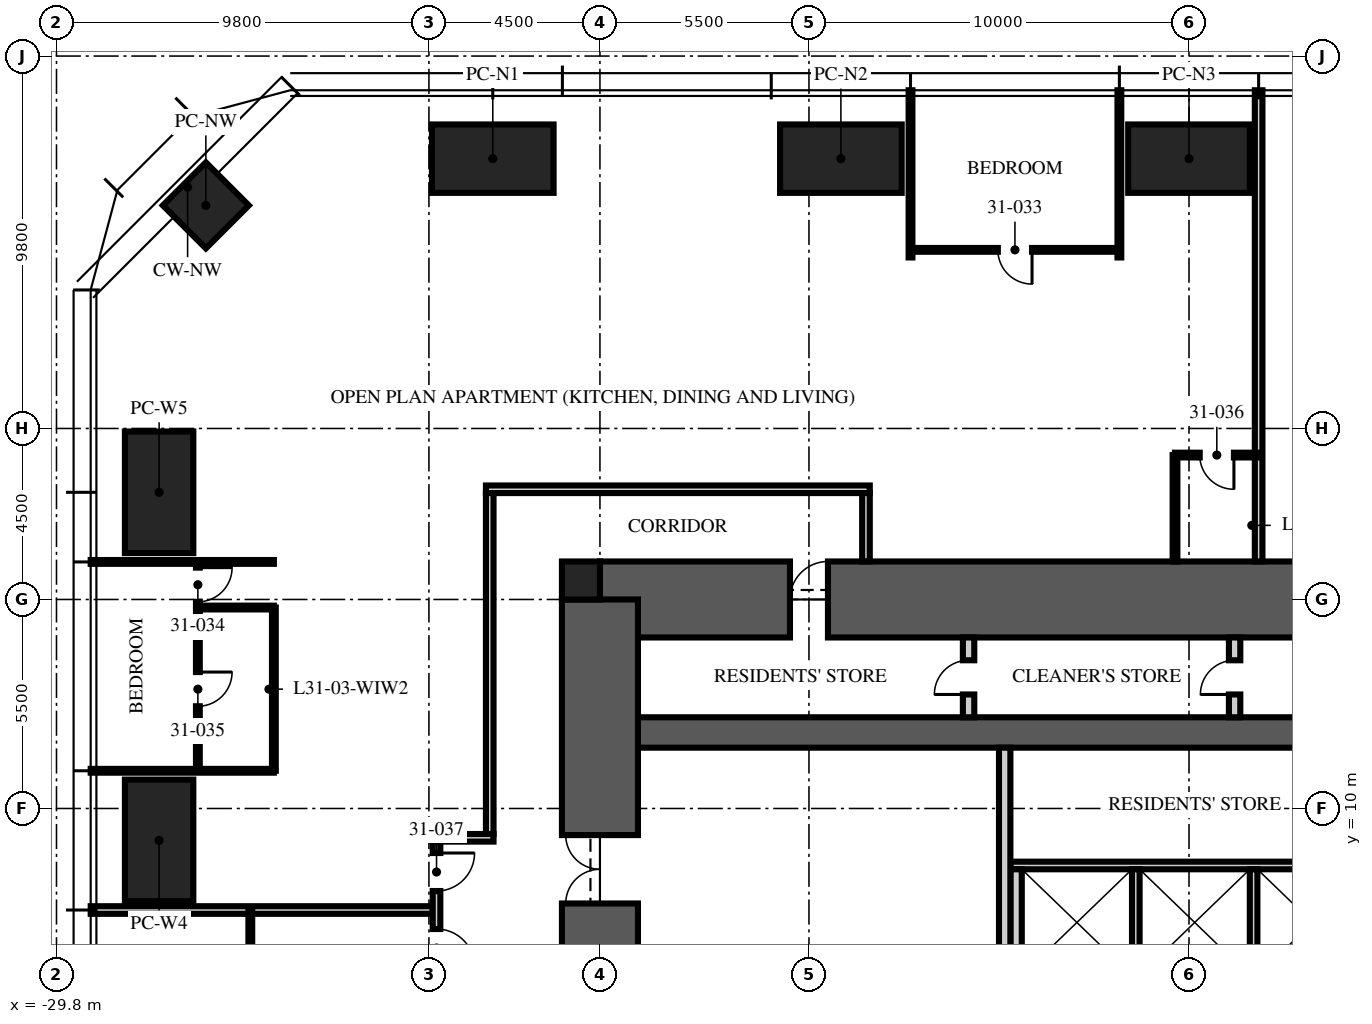
"""IFC4 building model, lengths in metres.
Left out: names, types, materials, properties, quantities, classifications, styles, units other than length and angle.
Written with IfcOpenShell. Run it as: python <this file> out.ifc"""

import sys

from ifc_helpers import new_model, si_unit, direction, frame, frame_2d, origin, origin_2d, place, context, subcontext, project, spatial, rectangle, extrude, element, fill, save


model = new_model("IFC4")
c1 = context("Model", 3, precision=1e-05, world=origin(), true_north=direction((0.0, 1.0)))
c2 = subcontext(c1, "Body", "Model", "MODEL_VIEW")
j1 = project(units=[si_unit("LENGTHUNIT", "METRE"), si_unit("PLANEANGLEUNIT", "RADIAN")], contexts=[c1])
p1 = place(None, origin())
s1 = spatial("IfcSite", under=j1, at=p1, CompositionType="ELEMENT")
p2 = place(p1, origin())
s2 = spatial("IfcBuilding", under=s1, at=p2, CompositionType="ELEMENT")
p3 = place(p2, frame((0.0, 0.0, 126.0)))
s3 = spatial("IfcBuildingStorey", under=s2, at=p3, CompositionType="ELEMENT", Elevation=126.0)
p4 = place(p3, frame((-15.5, 15.5, -0.25), z_axis=(0.0, 0.0, 1.0), x_axis=(1.0, 0.0, 0.0)))
e1 = element("IfcWall", 1, at=p4, inside=s3, PredefinedType="SHEAR", context=c2, shape_type="SweptSolid", body=[
    extrude(rectangle(XDim=31.0, YDim=2.0, at=frame_2d((15.5, 0.0))), origin(), (0.0, 0.0, 1.0), 3.75),
])
p5 = place(p4, frame((5.0, 0.0, 0.25)))
e2 = element("IfcOpeningElement", 2, at=p5, cuts=e1, PredefinedType="OPENING", context=c2, shape_type="SweptSolid", body=[
    extrude(rectangle(XDim=1.0, YDim=2.1, at=frame_2d((0.5, 1.05))), frame((0.0, 1.01, 0.0), z_axis=(0.0, -1.0, 0.0), x_axis=(1.0, 0.0, 0.0)), (0.0, 0.0, 1.0), 2.02),
])
p6 = place(p3, frame((-15.5, 12.0, -0.25), z_axis=(0.0, 0.0, 1.0), x_axis=(1.0, 0.0, 0.0)))
e3 = element("IfcWall", 3, at=p6, inside=s3, PredefinedType="SHEAR", context=c2, shape_type="SweptSolid", body=[
    extrude(rectangle(XDim=31.0, YDim=0.8, at=frame_2d((15.5, 0.0))), origin(), (0.0, 0.0, 1.0), 3.75),
])
p7 = place(p3, frame((-15.5, -15.5, -0.25), z_axis=(0.0, 0.0, 1.0), x_axis=(0.0, 1.0, 0.0)))
e4 = element("IfcWall", 4, at=p7, inside=s3, PredefinedType="SHEAR", context=c2, shape_type="SweptSolid", body=[
    extrude(rectangle(XDim=31.0, YDim=2.0, at=frame_2d((15.5, 0.0))), origin(), (0.0, 0.0, 1.0), 3.75),
])
p8 = place(p7, frame((6.5, 0.0, 0.25)))
e5 = element("IfcOpeningElement", 5, at=p8, cuts=e4, PredefinedType="OPENING", context=c2, shape_type="SweptSolid", body=[
    extrude(rectangle(XDim=1.2, YDim=2.1, at=frame_2d((0.6, 1.05))), frame((0.0, 1.01, 0.0), z_axis=(0.0, -1.0, 0.0), x_axis=(1.0, 0.0, 0.0)), (0.0, 0.0, 1.0), 2.02),
])
p9 = place(p7, frame((23.0, 0.0, 0.25)))
e6 = element("IfcOpeningElement", 6, at=p9, cuts=e4, PredefinedType="OPENING", context=c2, shape_type="SweptSolid", body=[
    extrude(rectangle(XDim=1.8, YDim=2.1, at=frame_2d((0.9, 1.05))), frame((0.0, 1.01, 0.0), z_axis=(0.0, -1.0, 0.0), x_axis=(1.0, 0.0, 0.0)), (0.0, 0.0, 1.0), 2.02),
])
p10 = place(p3, frame((-16.0, 16.0, -0.25), z_axis=(0.0, 0.0, 1.0), x_axis=(1.0, 0.0, 0.0)))
e7 = element("IfcColumn", 7, at=p10, inside=s3, PredefinedType="COLUMN", context=c2, shape_type="SweptSolid", body=[
    extrude(rectangle(XDim=1.0, YDim=1.0, at=origin_2d()), origin(), (0.0, 0.0, 1.0), 3.75),
])
for number, where, z_axis, x_axis in (
    (8, (-18.32, 27.1, 0.0), (0.0, 0.0, 1.0), (1.0, 0.0, 0.0)),
    (9, (-9.16, 27.1, 0.0), (0.0, 0.0, 1.0), (1.0, 0.0, 0.0)),
    (10, (0.0, 27.1, 0.0), (0.0, 0.0, 1.0), (1.0, 0.0, 0.0)),
    (11, (-27.1, 9.16, 0.0), (0.0, 0.0, 1.0), (0.0, 1.0, 0.0)),
    (12, (-27.1, 18.32, 0.0), (0.0, 0.0, 1.0), (0.0, 1.0, 0.0)),
):
    element("IfcColumn", number, at=place(p3, frame(where, z_axis=z_axis, x_axis=x_axis)), inside=s3, PredefinedType="COLUMN", context=c2, shape_type="SweptSolid", body=[
        extrude(rectangle(XDim=3.2, YDim=1.8, at=origin_2d()), origin(), (0.0, 0.0, 1.0), 3.75),
    ])
p11 = place(p3, frame((-25.87, 25.87, 0.0), z_axis=(0.0, 0.0, 1.0), x_axis=(0.707106781187, 0.707106781187, 0.0)))
e13 = element("IfcColumn", 13, at=p11, inside=s3, PredefinedType="COLUMN", context=c2, shape_type="SweptSolid", body=[
    extrude(rectangle(XDim=1.6, YDim=1.6, at=origin_2d()), origin(), (0.0, 0.0, 1.0), 3.75),
])
p12 = place(p3, frame((-4.7, 8.5, 0.0), z_axis=(0.0, 0.0, 1.0), x_axis=(1.0, 0.0, 0.0)))
e14 = element("IfcWall", 14, at=p12, inside=s3, PredefinedType="PARTITIONING", context=c2, shape_type="SweptSolid", body=[
    extrude(rectangle(XDim=9.7, YDim=0.2, at=frame_2d((4.85, 0.0))), origin(), (0.0, 0.0, 1.0), 3.5),
])
p13 = place(p3, frame((-4.55, 5.6, 0.0), z_axis=(0.0, 0.0, 1.0), x_axis=(0.0, 1.0, 0.0)))
e15 = element("IfcWall", 15, at=p13, inside=s3, PredefinedType="PARTITIONING", context=c2, shape_type="SweptSolid", body=[
    extrude(rectangle(XDim=2.8, YDim=0.3, at=frame_2d((1.4, 0.0))), origin(), (0.0, 0.0, 1.0), 3.5),
])
for number, where, z_axis, x_axis in (
    (16, (-1.4, 5.6, 0.0), (0.0, 0.0, 1.0), (0.0, 1.0, 0.0)),
    (17, (1.7, 5.6, 0.0), (0.0, 0.0, 1.0), (0.0, 1.0, 0.0)),
):
    element("IfcWall", number, at=place(p3, frame(where, z_axis=z_axis, x_axis=x_axis)), inside=s3, PredefinedType="PARTITIONING", context=c2, shape_type="SweptSolid", body=[
        extrude(rectangle(XDim=2.8, YDim=0.2, at=frame_2d((1.4, 0.0))), origin(), (0.0, 0.0, 1.0), 3.5),
    ])
p14 = place(p3, frame((-4.85, 5.3, 0.0), z_axis=(0.0, 0.0, 1.0), x_axis=(0.0, 1.0, 0.0)))
e18 = element("IfcWall", 18, at=p14, inside=s3, PredefinedType="PARTITIONING", context=c2, shape_type="SweptSolid", body=[
    extrude(rectangle(XDim=6.3, YDim=0.3, at=frame_2d((3.15, 0.0))), origin(), (0.0, 0.0, 1.0), 3.5),
])
p15 = place(p3, frame((-5.8, 12.4, 0.0), z_axis=(0.0, 0.0, 1.0), x_axis=(0.0, 1.0, 0.0)))
e19 = element("IfcWall", 19, at=p15, inside=s3, PredefinedType="PARTITIONING", context=c2, shape_type="SweptSolid", body=[
    extrude(rectangle(XDim=2.1, YDim=0.3, at=frame_2d((1.05, 0.0))), origin(), (0.0, 0.0, 1.0), 3.5),
])
p16 = place(p15, frame((0.6, 0.0, 0.0)))
e20 = element("IfcOpeningElement", 20, at=p16, cuts=e19, PredefinedType="OPENING", context=c2, shape_type="SweptSolid", body=[
    extrude(rectangle(XDim=0.9, YDim=2.1, at=frame_2d((0.45, 1.05))), frame((0.0, 0.16, 0.0), z_axis=(0.0, -1.0, 0.0), x_axis=(1.0, 0.0, 0.0)), (0.0, 0.0, 1.0), 0.32),
])
p17 = place(p3, frame((1.2, 12.4, 0.0), z_axis=(0.0, 0.0, 1.0), x_axis=(0.0, 1.0, 0.0)))
e21 = element("IfcWall", 21, at=p17, inside=s3, PredefinedType="PARTITIONING", context=c2, shape_type="SweptSolid", body=[
    extrude(rectangle(XDim=2.1, YDim=0.3, at=frame_2d((1.05, 0.0))), origin(), (0.0, 0.0, 1.0), 3.5),
])
p18 = place(p17, frame((0.6, 0.0, 0.0)))
e22 = element("IfcOpeningElement", 22, at=p18, cuts=e21, PredefinedType="OPENING", context=c2, shape_type="SweptSolid", body=[
    extrude(rectangle(XDim=0.9, YDim=2.1, at=frame_2d((0.45, 1.05))), frame((0.0, 0.16, 0.0), z_axis=(0.0, -1.0, 0.0), x_axis=(1.0, 0.0, 0.0)), (0.0, 0.0, 1.0), 0.32),
])
p19 = place(p3, frame((-18.5, 18.4, 0.0), z_axis=(0.0, 0.0, 1.0), x_axis=(1.0, 0.0, 0.0)))
e23 = element("IfcWall", 23, at=p19, inside=s3, PredefinedType="PARTITIONING", context=c2, shape_type="SweptSolid", body=[
    extrude(rectangle(XDim=10.1, YDim=0.2, at=frame_2d((5.05, 0.0))), origin(), (0.0, 0.0, 1.0), 2.3),
])
p20 = place(p3, frame((-8.5, 18.3, 0.0), z_axis=(0.0, 0.0, 1.0), x_axis=(0.0, -1.0, 0.0)))
e24 = element("IfcWall", 24, at=p20, inside=s3, PredefinedType="PARTITIONING", context=c2, shape_type="SweptSolid", body=[
    extrude(rectangle(XDim=1.8, YDim=0.2, at=frame_2d((0.9, 0.0))), origin(), (0.0, 0.0, 1.0), 3.5),
])
p21 = place(p3, frame((1.832, 16.5, 0.0), z_axis=(0.0, 0.0, 1.0), x_axis=(0.0, 1.0, 0.0)))
e25 = element("IfcWall", 25, at=p21, inside=s3, PredefinedType="PARTITIONING", context=c2, shape_type="SweptSolid", body=[
    extrude(rectangle(XDim=12.4, YDim=0.2, at=frame_2d((6.2, 0.0))), origin(), (0.0, 0.0, 1.0), 2.81),
])
for number, where, z_axis, x_axis in (
    (26, (-1.832, 24.5, 0.0), (0.0, 0.0, 1.0), (0.0, 1.0, 0.0)),
    (27, (-7.328, 24.5, 0.0), (0.0, 0.0, 1.0), (0.0, 1.0, 0.0)),
):
    element("IfcWall", number, at=place(p3, frame(where, z_axis=z_axis, x_axis=x_axis)), inside=s3, PredefinedType="PARTITIONING", context=c2, shape_type="SweptSolid", body=[
        extrude(rectangle(XDim=4.4, YDim=0.1, at=frame_2d((2.2, 0.0))), origin(), (0.0, 0.0, 1.0), 2.81),
    ])
for number, where, z_axis, x_axis in (
    (28, (-24.08, 16.488, 0.0), (0.0, 0.0, 1.0), (-1.0, 0.0, 0.0)),
    (29, (-24.08, 10.992, 0.0), (0.0, 0.0, 1.0), (-1.0, 0.0, 0.0)),
):
    element("IfcWall", number, at=place(p3, frame(where, z_axis=z_axis, x_axis=x_axis)), inside=s3, PredefinedType="PARTITIONING", context=c2, shape_type="SweptSolid", body=[
        extrude(rectangle(XDim=4.82, YDim=0.1, at=frame_2d((2.41, 0.0))), origin(), (0.0, 0.0, 1.0), 2.81),
    ])
p22 = place(p3, frame((-19.9, 7.328, 0.0), z_axis=(0.0, 0.0, 1.0), x_axis=(-1.0, 0.0, 0.0)))
e30 = element("IfcWall", 30, at=p22, inside=s3, PredefinedType="PARTITIONING", context=c2, shape_type="SweptSolid", body=[
    extrude(rectangle(XDim=9.0, YDim=0.2, at=frame_2d((4.5, 0.0))), origin(), (0.0, 0.0, 1.0), 2.81),
])
p23 = place(p3, frame((-1.832, 24.7, 0.0), z_axis=(0.0, 0.0, 1.0), x_axis=(-1.0, 0.0, 0.0)))
e31 = element("IfcWall", 31, at=p23, inside=s3, PredefinedType="PARTITIONING", context=c2, shape_type="SweptSolid", body=[
    extrude(rectangle(XDim=5.496, YDim=0.1, at=frame_2d((2.748, 0.0))), origin(), (0.0, 0.0, 1.0), 2.81),
])
p24 = place(p23, frame((2.298, 0.0, 0.0)))
e32 = element("IfcOpeningElement", 32, at=p24, cuts=e31, PredefinedType="OPENING", context=c2, shape_type="SweptSolid", body=[
    extrude(rectangle(XDim=0.9, YDim=2.1, at=frame_2d((0.45, 1.05))), frame((0.0, 0.06, 0.0), z_axis=(0.0, -1.0, 0.0), x_axis=(1.0, 0.0, 0.0)), (0.0, 0.0, 1.0), 0.12),
])
p25 = place(p3, frame((-26.08, 16.488, 0.0), z_axis=(0.0, 0.0, 1.0), x_axis=(0.0, -1.0, 0.0)))
e33 = element("IfcWall", 33, at=p25, inside=s3, PredefinedType="PARTITIONING", context=c2, shape_type="SweptSolid", body=[
    extrude(rectangle(XDim=5.496, YDim=0.1, at=frame_2d((2.748, 0.0))), origin(), (0.0, 0.0, 1.0), 2.81),
])
p26 = place(p25, frame((0.15, 0.0, 0.0)))
e34 = element("IfcOpeningElement", 34, at=p26, cuts=e33, PredefinedType="OPENING", context=c2, shape_type="SweptSolid", body=[
    extrude(rectangle(XDim=0.9, YDim=2.1, at=frame_2d((0.45, 1.05))), frame((0.0, 0.06, 0.0), z_axis=(0.0, -1.0, 0.0), x_axis=(1.0, 0.0, 0.0)), (0.0, 0.0, 1.0), 0.12),
])
p27 = place(p25, frame((2.898, 0.0, 0.0)))
e35 = element("IfcOpeningElement", 35, at=p27, cuts=e33, PredefinedType="OPENING", context=c2, shape_type="SweptSolid", body=[
    extrude(rectangle(XDim=0.9, YDim=2.1, at=frame_2d((0.45, 1.05))), frame((0.0, 0.06, 0.0), z_axis=(0.0, -1.0, 0.0), x_axis=(1.0, 0.0, 0.0)), (0.0, 0.0, 1.0), 0.12),
])
p28 = place(p3, frame((-24.08, 15.288, 0.0), z_axis=(0.0, 0.0, 1.0), x_axis=(-1.0, 0.0, 0.0)))
e36 = element("IfcWall", 36, at=p28, inside=s3, PredefinedType="PARTITIONING", context=c2, shape_type="SweptSolid", body=[
    extrude(rectangle(XDim=2.0, YDim=0.1, at=frame_2d((1.0, 0.0))), origin(), (0.0, 0.0, 1.0), 3.5),
])
p29 = place(p3, frame((-24.08, 15.288, 0.0), z_axis=(0.0, 0.0, 1.0), x_axis=(0.0, -1.0, 0.0)))
e37 = element("IfcWall", 37, at=p29, inside=s3, PredefinedType="PARTITIONING", context=c2, shape_type="SweptSolid", body=[
    extrude(rectangle(XDim=4.296, YDim=0.1, at=frame_2d((2.148, 0.0))), origin(), (0.0, 0.0, 1.0), 2.81),
])
p30 = place(p3, frame((1.832, 19.3, 0.0), z_axis=(0.0, 0.0, 1.0), x_axis=(-1.0, 0.0, 0.0)))
e38 = element("IfcWall", 38, at=p30, inside=s3, PredefinedType="PARTITIONING", context=c2, shape_type="SweptSolid", body=[
    extrude(rectangle(XDim=2.2, YDim=0.125, at=frame_2d((1.1, 0.0))), origin(), (0.0, 0.0, 1.0), 2.7),
])
p31 = place(p30, frame((0.65, 0.0, 0.0)))
e39 = element("IfcOpeningElement", 39, at=p31, cuts=e38, PredefinedType="OPENING", context=c2, shape_type="SweptSolid", body=[
    extrude(rectangle(XDim=0.9, YDim=2.1, at=frame_2d((0.45, 1.05))), frame((0.0, 0.073, 0.0), z_axis=(0.0, -1.0, 0.0), x_axis=(1.0, 0.0, 0.0)), (0.0, 0.0, 1.0), 0.145),
])
p32 = place(p3, frame((-0.368, 16.5, 0.0), z_axis=(0.0, 0.0, 1.0), x_axis=(0.0, 1.0, 0.0)))
e40 = element("IfcWall", 40, at=p32, inside=s3, PredefinedType="PARTITIONING", context=c2, shape_type="SweptSolid", body=[
    extrude(rectangle(XDim=2.8, YDim=0.125, at=frame_2d((1.4, 0.0))), origin(), (0.0, 0.0, 1.0), 3.5),
])
p33 = place(p3, frame((-24.7, 7.328, 0.0), z_axis=(0.0, 0.0, 1.0), x_axis=(0.0, -1.0, 0.0)))
e41 = element("IfcWall", 41, at=p33, inside=s3, PredefinedType="PARTITIONING", context=c2, shape_type="SweptSolid", body=[
    extrude(rectangle(XDim=5.496, YDim=0.1, at=frame_2d((2.748, 0.0))), origin(), (0.0, 0.0, 1.0), 2.81),
])
p34 = place(p33, frame((2.298, 0.0, 0.0)))
e42 = element("IfcOpeningElement", 42, at=p34, cuts=e41, PredefinedType="OPENING", context=c2, shape_type="SweptSolid", body=[
    extrude(rectangle(XDim=0.9, YDim=2.1, at=frame_2d((0.45, 1.05))), frame((0.0, 0.06, 0.0), z_axis=(0.0, -1.0, 0.0), x_axis=(1.0, 0.0, 0.0)), (0.0, 0.0, 1.0), 0.12),
])
p35 = place(p3, frame((-18.4, 18.3, 0.0), z_axis=(0.0, 0.0, 1.0), x_axis=(0.0, -1.0, 0.0)))
e43 = element("IfcWall", 43, at=p35, inside=s3, PredefinedType="PARTITIONING", context=c2, shape_type="SweptSolid", body=[
    extrude(rectangle(XDim=8.972, YDim=0.2, at=frame_2d((4.486, 0.0))), origin(), (0.0, 0.0, 1.0), 2.3),
])
p36 = place(p3, frame((-18.3, 9.228, 0.0), z_axis=(0.0, 0.0, 1.0), x_axis=(-1.0, 0.0, 0.0)))
e44 = element("IfcWall", 44, at=p36, inside=s3, PredefinedType="PARTITIONING", context=c2, shape_type="SweptSolid", body=[
    extrude(rectangle(XDim=1.6, YDim=0.2, at=frame_2d((0.8, 0.0))), origin(), (0.0, 0.0, 1.0), 2.7),
])
p37 = place(p3, frame((-19.8, 9.128, 0.0), z_axis=(0.0, 0.0, 1.0), x_axis=(0.0, -1.0, 0.0)))
e45 = element("IfcWall", 45, at=p37, inside=s3, PredefinedType="PARTITIONING", context=c2, shape_type="SweptSolid", body=[
    extrude(rectangle(XDim=3.6, YDim=0.2, at=frame_2d((1.8, 0.0))), origin(), (0.0, 0.0, 1.0), 2.7),
])
p38 = place(p37, frame((0.3, 0.0, 0.0)))
e46 = element("IfcOpeningElement", 46, at=p38, cuts=e45, PredefinedType="OPENING", context=c2, shape_type="SweptSolid", body=[
    extrude(rectangle(XDim=1.0, YDim=2.2, at=frame_2d((0.5, 1.1))), frame((0.0, 0.11, 0.0), z_axis=(0.0, -1.0, 0.0), x_axis=(1.0, 0.0, 0.0)), (0.0, 0.0, 1.0), 0.22),
])
p39 = place(p37, frame((2.3, 0.0, 0.0)))
e47 = element("IfcOpeningElement", 47, at=p39, cuts=e45, PredefinedType="OPENING", context=c2, shape_type="SweptSolid", body=[
    extrude(rectangle(XDim=1.0, YDim=2.2, at=frame_2d((0.5, 1.1))), frame((0.0, 0.11, 0.0), z_axis=(0.0, -1.0, 0.0), x_axis=(1.0, 0.0, 0.0)), (0.0, 0.0, 1.0), 0.22),
])
p40 = place(p9, origin())
e48 = element("IfcDoor", 48, at=p40, inside=s3, OperationType="DOUBLE_DOOR_SINGLE_SWING", PredefinedType="DOOR", context=c2, shape_type="SweptSolid", body=[
    extrude(rectangle(XDim=1.8, YDim=2.1, at=frame_2d((0.9, 1.05))), frame((0.0, 0.025, 0.0), z_axis=(0.0, -1.0, 0.0), x_axis=(1.0, 0.0, 0.0)), (0.0, 0.0, 1.0), 0.05),
])
fill(e6, e48)
p41 = place(p16, origin())
e49 = element("IfcDoor", 49, at=p41, inside=s3, OperationType="SINGLE_SWING_LEFT", PredefinedType="DOOR", context=c2, shape_type="SweptSolid", body=[
    extrude(rectangle(XDim=0.9, YDim=2.1, at=frame_2d((0.45, 1.05))), frame((0.0, 0.025, 0.0), z_axis=(0.0, -1.0, 0.0), x_axis=(1.0, 0.0, 0.0)), (0.0, 0.0, 1.0), 0.05),
])
fill(e20, e49)
p42 = place(p18, origin())
e50 = element("IfcDoor", 50, at=p42, inside=s3, OperationType="SINGLE_SWING_LEFT", PredefinedType="DOOR", context=c2, shape_type="SweptSolid", body=[
    extrude(rectangle(XDim=0.9, YDim=2.1, at=frame_2d((0.45, 1.05))), frame((0.0, 0.025, 0.0), z_axis=(0.0, -1.0, 0.0), x_axis=(1.0, 0.0, 0.0)), (0.0, 0.0, 1.0), 0.05),
])
fill(e22, e50)
p43 = place(p5, origin())
e51 = element("IfcDoor", 51, at=p43, inside=s3, OperationType="SINGLE_SWING_RIGHT", PredefinedType="DOOR", context=c2, shape_type="SweptSolid", body=[
    extrude(rectangle(XDim=1.0, YDim=2.1, at=frame_2d((0.5, 1.05))), frame((0.0, 0.025, 0.0), z_axis=(0.0, -1.0, 0.0), x_axis=(1.0, 0.0, 0.0)), (0.0, 0.0, 1.0), 0.05),
])
fill(e2, e51)
p44 = place(p24, origin())
e52 = element("IfcDoor", 52, at=p44, inside=s3, OperationType="SINGLE_SWING_LEFT", PredefinedType="DOOR", context=c2, shape_type="SweptSolid", body=[
    extrude(rectangle(XDim=0.9, YDim=2.1, at=frame_2d((0.45, 1.05))), frame((0.0, 0.025, 0.0), z_axis=(0.0, -1.0, 0.0), x_axis=(1.0, 0.0, 0.0)), (0.0, 0.0, 1.0), 0.05),
])
fill(e32, e52)
p45 = place(p26, origin())
e53 = element("IfcDoor", 53, at=p45, inside=s3, OperationType="SINGLE_SWING_LEFT", PredefinedType="DOOR", context=c2, shape_type="SweptSolid", body=[
    extrude(rectangle(XDim=0.9, YDim=2.1, at=frame_2d((0.45, 1.05))), frame((0.0, 0.025, 0.0), z_axis=(0.0, -1.0, 0.0), x_axis=(1.0, 0.0, 0.0)), (0.0, 0.0, 1.0), 0.05),
])
fill(e34, e53)
p46 = place(p27, origin())
e54 = element("IfcDoor", 54, at=p46, inside=s3, OperationType="SINGLE_SWING_LEFT", PredefinedType="DOOR", context=c2, shape_type="SweptSolid", body=[
    extrude(rectangle(XDim=0.9, YDim=2.1, at=frame_2d((0.45, 1.05))), frame((0.0, 0.025, 0.0), z_axis=(0.0, -1.0, 0.0), x_axis=(1.0, 0.0, 0.0)), (0.0, 0.0, 1.0), 0.05),
])
fill(e35, e54)
p47 = place(p31, origin())
e55 = element("IfcDoor", 55, at=p47, inside=s3, OperationType="SINGLE_SWING_LEFT", PredefinedType="DOOR", context=c2, shape_type="SweptSolid", body=[
    extrude(rectangle(XDim=0.9, YDim=2.1, at=frame_2d((0.45, 1.05))), frame((0.0, 0.025, 0.0), z_axis=(0.0, -1.0, 0.0), x_axis=(1.0, 0.0, 0.0)), (0.0, 0.0, 1.0), 0.05),
])
fill(e39, e55)
p48 = place(p38, origin())
e56 = element("IfcDoor", 56, at=p48, inside=s3, OperationType="SINGLE_SWING_LEFT", PredefinedType="DOOR", context=c2, shape_type="SweptSolid", body=[
    extrude(rectangle(XDim=1.0, YDim=2.2, at=frame_2d((0.5, 1.1))), frame((0.0, 0.025, 0.0), z_axis=(0.0, -1.0, 0.0), x_axis=(1.0, 0.0, 0.0)), (0.0, 0.0, 1.0), 0.05),
])
fill(e46, e56)
p49 = place(p39, origin())
e57 = element("IfcDoor", 57, at=p49, inside=s3, OperationType="SINGLE_SWING_RIGHT", PredefinedType="DOOR", context=c2, shape_type="SweptSolid", body=[
    extrude(rectangle(XDim=1.0, YDim=2.2, at=frame_2d((0.5, 1.1))), frame((0.0, 0.025, 0.0), z_axis=(0.0, -1.0, 0.0), x_axis=(1.0, 0.0, 0.0)), (0.0, 0.0, 1.0), 0.05),
])
fill(e47, e57)
save(model, sys.argv[1])
